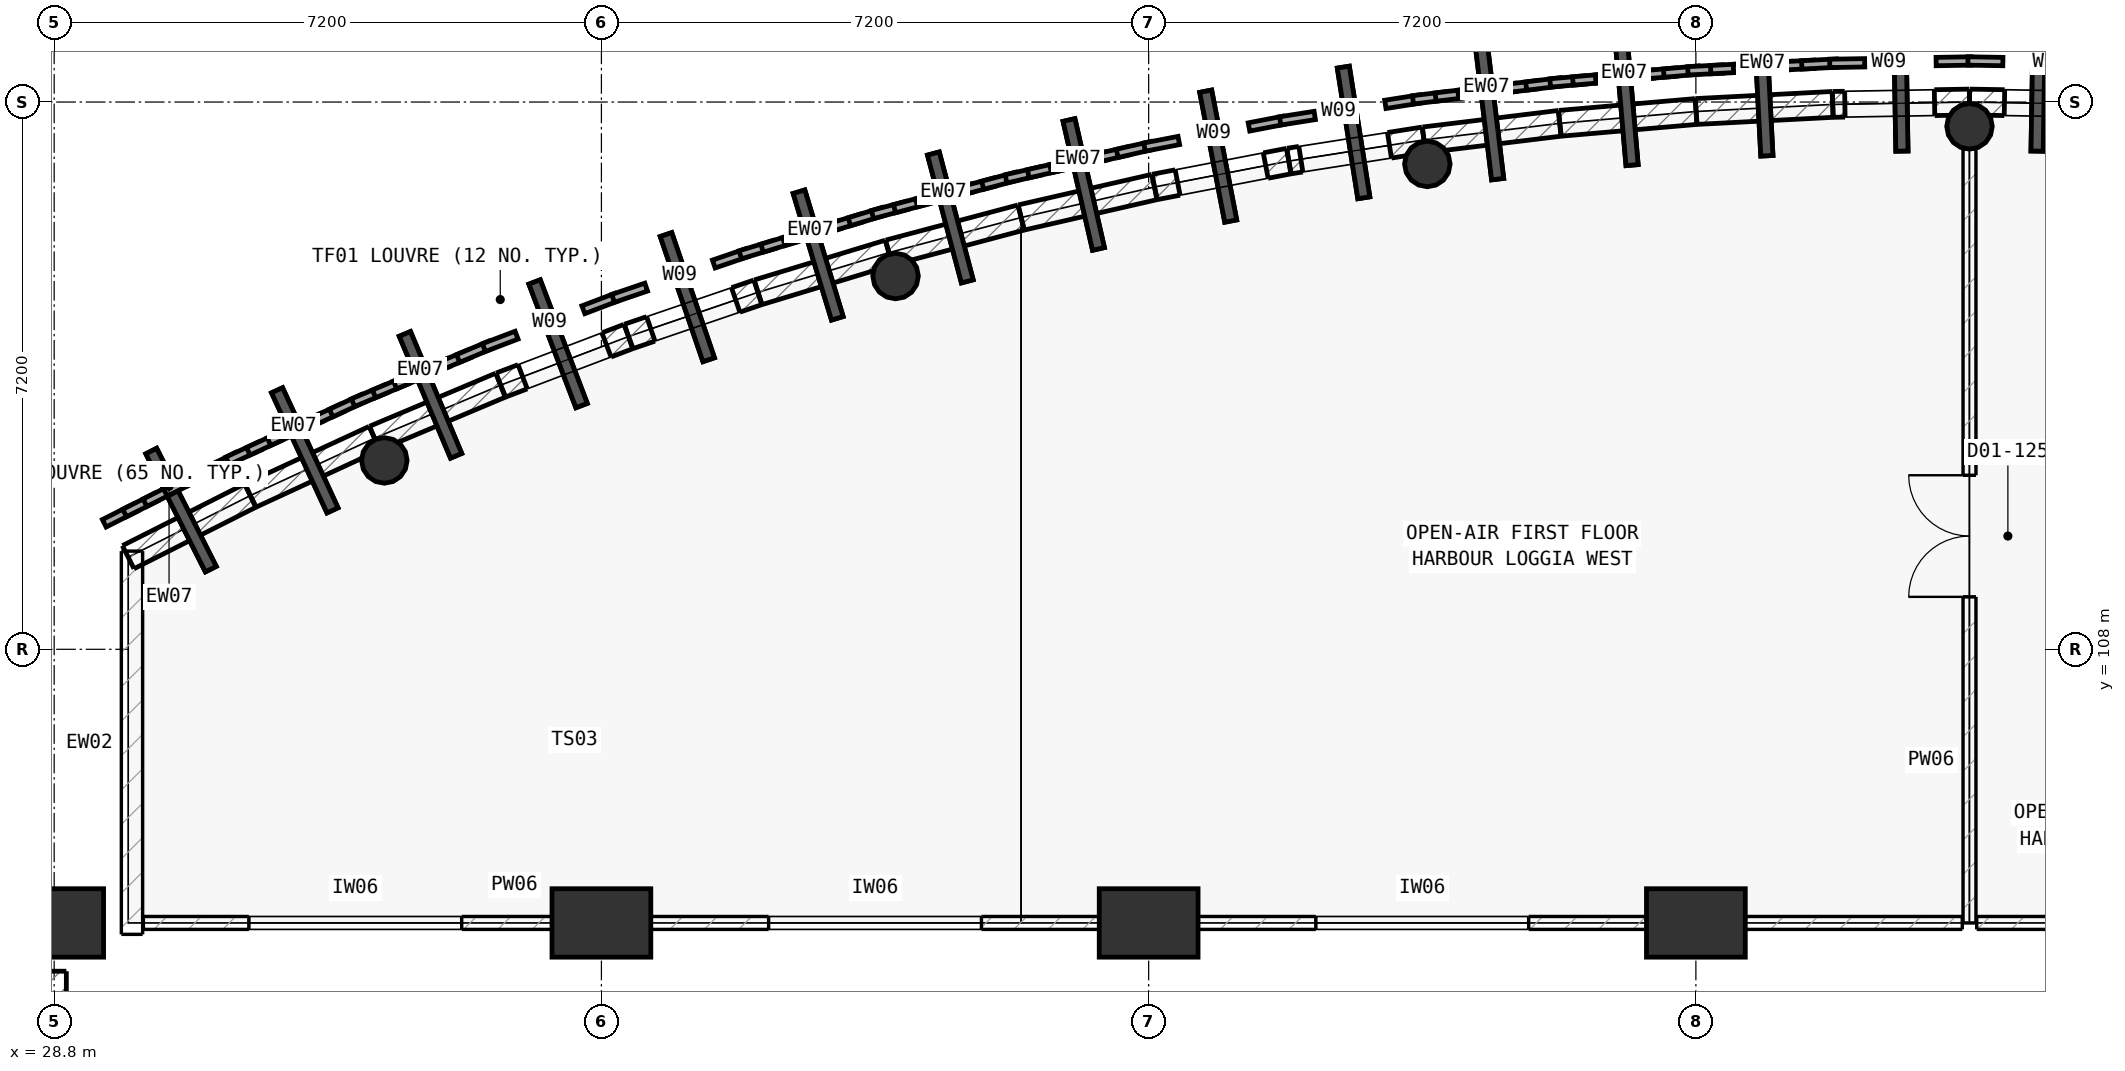
"""IFC4 building model, lengths in metres.
Left out: names, types, materials, properties, quantities, classifications, styles, units other than length and angle.
Written with IfcOpenShell. Run it as: python <this file> out.ifc"""

import sys

from ifc_helpers import new_model, si_unit, direction, frame, frame_2d, origin, origin_2d, place, context, subcontext, project, spatial, polyline, rectangle, circle, outline, extrude, element, fill, save


model = new_model("IFC4")
c1 = context("Model", 3, precision=1e-05, world=origin(), true_north=direction((0.0, 1.0)))
c2 = subcontext(c1, "Body", "Model", "MODEL_VIEW")
j1 = project(units=[si_unit("LENGTHUNIT", "METRE"), si_unit("PLANEANGLEUNIT", "RADIAN")], contexts=[c1])
p1 = place(None, origin())
s1 = spatial("IfcSite", under=j1, at=p1, CompositionType="ELEMENT")
p2 = place(p1, origin())
s2 = spatial("IfcBuilding", under=s1, at=p2, CompositionType="ELEMENT")
p3 = place(p2, frame((0.0, 0.0, 5.6)))
s3 = spatial("IfcBuildingStorey", under=s2, at=p3, CompositionType="ELEMENT", Elevation=5.6)
p4 = place(p3, frame((28.8, 104.4, 0.0), z_axis=(0.0, 0.0, 1.0), x_axis=(1.0, 0.0, 0.0)))
e1 = element("IfcColumn", 1, at=p4, inside=s3, PredefinedType="COLUMN", context=c2, shape_type="SweptSolid", body=[
    extrude(rectangle(XDim=0.9, YDim=1.3, at=origin_2d()), origin(), (0.0, 0.0, 1.0), 4.8),
])
p5 = place(p3, frame((33.144, 110.485, 0.0), z_axis=(0.0, 0.0, 1.0), x_axis=(1.0, 0.0, 0.0)))
e2 = element("IfcColumn", 2, at=p5, inside=s3, PredefinedType="COLUMN", context=c2, shape_type="SweptSolid", body=[
    extrude(circle(Radius=0.3, at=origin_2d()), origin(), (0.0, 0.0, 1.0), 5.6),
])
p6 = place(p3, frame((36.0, 104.4, 0.0), z_axis=(0.0, 0.0, 1.0), x_axis=(1.0, 0.0, 0.0)))
e3 = element("IfcColumn", 3, at=p6, inside=s3, PredefinedType="COLUMN", context=c2, shape_type="SweptSolid", body=[
    extrude(rectangle(XDim=0.9, YDim=1.3, at=origin_2d()), origin(), (0.0, 0.0, 1.0), 4.8),
])
p7 = place(p3, frame((39.87, 112.911, 0.0), z_axis=(0.0, 0.0, 1.0), x_axis=(1.0, 0.0, 0.0)))
e4 = element("IfcColumn", 4, at=p7, inside=s3, PredefinedType="COLUMN", context=c2, shape_type="SweptSolid", body=[
    extrude(circle(Radius=0.3, at=origin_2d()), origin(), (0.0, 0.0, 1.0), 5.6),
])
p8 = place(p3, frame((43.2, 104.4, 0.0), z_axis=(0.0, 0.0, 1.0), x_axis=(1.0, 0.0, 0.0)))
e5 = element("IfcColumn", 5, at=p8, inside=s3, PredefinedType="COLUMN", context=c2, shape_type="SweptSolid", body=[
    extrude(rectangle(XDim=0.9, YDim=1.3, at=origin_2d()), origin(), (0.0, 0.0, 1.0), 4.8),
])
p9 = place(p3, frame((46.867, 114.385, 0.0), z_axis=(0.0, 0.0, 1.0), x_axis=(1.0, 0.0, 0.0)))
e6 = element("IfcColumn", 6, at=p9, inside=s3, PredefinedType="COLUMN", context=c2, shape_type="SweptSolid", body=[
    extrude(circle(Radius=0.3, at=origin_2d()), origin(), (0.0, 0.0, 1.0), 5.6),
])
p10 = place(p3, frame((50.4, 104.4, 0.0), z_axis=(0.0, 0.0, 1.0), x_axis=(1.0, 0.0, 0.0)))
e7 = element("IfcColumn", 7, at=p10, inside=s3, PredefinedType="COLUMN", context=c2, shape_type="SweptSolid", body=[
    extrude(rectangle(XDim=0.9, YDim=1.3, at=origin_2d()), origin(), (0.0, 0.0, 1.0), 4.8),
])
p11 = place(p3, frame((54.0, 114.88, 0.0), z_axis=(0.0, 0.0, 1.0), x_axis=(1.0, 0.0, 0.0)))
e8 = element("IfcColumn", 8, at=p11, inside=s3, PredefinedType="COLUMN", context=c2, shape_type="SweptSolid", body=[
    extrude(circle(Radius=0.3, at=origin_2d()), origin(), (0.0, 0.0, 1.0), 5.6),
])
for number, where, z_axis, x_axis in (
    (9, (29.774, 109.212, 0.0), (0.0, 0.0, 1.0), (0.893, 0.45, 0.0)),
    (10, (31.381, 110.023, 0.0), (0.0, 0.0, 1.0), (0.908, 0.419, 0.0)),
):
    element("IfcWall", number, at=place(p3, frame(where, z_axis=z_axis, x_axis=x_axis)), inside=s3, PredefinedType="SOLIDWALL", context=c2, shape_type="SweptSolid", body=[
        extrude(outline(polyline([(0.003, -0.17), (1.797, -0.17), (1.803, 0.17), (-0.003, 0.17), (0.003, -0.17)])), origin(), (0.0, 0.0, 1.0), 5.6),
    ])
p12 = place(p3, frame((33.015, 110.778, 0.0), z_axis=(0.0, 0.0, 1.0), x_axis=(0.921803799964, 0.387656748131, 0.0)))
e11 = element("IfcWall", 11, at=p12, inside=s3, PredefinedType="SOLIDWALL", context=c2, shape_type="SweptSolid", body=[
    extrude(outline(polyline([(0.003, -0.17), (1.797, -0.17), (1.803, 0.17), (-0.003, 0.17), (0.003, -0.17)])), origin(), (0.0, 0.0, 1.0), 5.6),
])
p13 = place(p3, frame((34.674, 111.475, 0.0), z_axis=(0.0, 0.0, 1.0), x_axis=(0.934674543416, 0.35550456803, 0.0)))
e12 = element("IfcWall", 12, at=p13, inside=s3, PredefinedType="SOLIDWALL", context=c2, shape_type="SweptSolid", body=[
    extrude(outline(polyline([(0.003, -0.17), (1.797, -0.17), (1.803, 0.17), (-0.003, 0.17), (0.003, -0.17)])), origin(), (0.0, 0.0, 1.0), 5.6),
])
p14 = place(p13, frame((0.31, 0.0, 0.7)))
e13 = element("IfcOpeningElement", 13, at=p14, cuts=e12, PredefinedType="OPENING", context=c2, shape_type="SweptSolid", body=[
    extrude(rectangle(XDim=1.18, YDim=4.1, at=frame_2d((0.59, 2.05))), frame((0.0, 0.18, 0.0), z_axis=(0.0, -1.0, 0.0), x_axis=(1.0, 0.0, 0.0)), (0.0, 0.0, 1.0), 0.36),
])
p15 = place(p3, frame((36.356, 112.115, 0.0), z_axis=(0.0, 0.0, 1.0), x_axis=(0.946421657721, 0.322933500578, 0.0)))
e14 = element("IfcWall", 14, at=p15, inside=s3, PredefinedType="SOLIDWALL", context=c2, shape_type="SweptSolid", body=[
    extrude(outline(polyline([(0.003, -0.17), (1.797, -0.17), (1.803, 0.17), (-0.003, 0.17), (0.003, -0.17)])), origin(), (0.0, 0.0, 1.0), 5.6),
])
p16 = place(p15, frame((0.31, 0.0, 0.7)))
e15 = element("IfcOpeningElement", 15, at=p16, cuts=e14, PredefinedType="OPENING", context=c2, shape_type="SweptSolid", body=[
    extrude(rectangle(XDim=1.18, YDim=4.1, at=frame_2d((0.59, 2.05))), frame((0.0, 0.18, 0.0), z_axis=(0.0, -1.0, 0.0), x_axis=(1.0, 0.0, 0.0)), (0.0, 0.0, 1.0), 0.36),
])
p17 = place(p3, frame((38.06, 112.697, 0.0), z_axis=(0.0, 0.0, 1.0), x_axis=(0.956993600338, 0.290109029354, 0.0)))
e16 = element("IfcWall", 16, at=p17, inside=s3, PredefinedType="SOLIDWALL", context=c2, shape_type="SweptSolid", body=[
    extrude(outline(polyline([(0.003, -0.17), (1.797, -0.17), (1.803, 0.17), (-0.003, 0.17), (0.003, -0.17)])), origin(), (0.0, 0.0, 1.0), 5.6),
])
p18 = place(p3, frame((39.783, 113.219, 0.0), z_axis=(0.0, 0.0, 1.0), x_axis=(0.966504582235, 0.256649357135, 0.0)))
e17 = element("IfcWall", 17, at=p18, inside=s3, PredefinedType="SOLIDWALL", context=c2, shape_type="SweptSolid", body=[
    extrude(outline(polyline([(0.003, -0.17), (1.797, -0.17), (1.803, 0.17), (-0.003, 0.17), (0.003, -0.17)])), origin(), (0.0, 0.0, 1.0), 5.6),
])
p19 = place(p3, frame((41.522, 113.681, 0.0), z_axis=(0.0, 0.0, 1.0), x_axis=(0.974791962114, 0.223115733641, 0.0)))
e18 = element("IfcWall", 18, at=p19, inside=s3, PredefinedType="SOLIDWALL", context=c2, shape_type="SweptSolid", body=[
    extrude(outline(polyline([(0.003, -0.17), (1.797, -0.17), (1.803, 0.17), (-0.003, 0.17), (0.003, -0.17)])), origin(), (0.0, 0.0, 1.0), 5.6),
])
p20 = place(p3, frame((43.277, 114.082, 0.0), z_axis=(0.0, 0.0, 1.0), x_axis=(0.981913462005, 0.189330275271, 0.0)))
e19 = element("IfcWall", 19, at=p20, inside=s3, PredefinedType="SOLIDWALL", context=c2, shape_type="SweptSolid", body=[
    extrude(outline(polyline([(0.003, -0.17), (1.797, -0.17), (1.803, 0.17), (-0.003, 0.17), (0.003, -0.17)])), origin(), (0.0, 0.0, 1.0), 5.6),
])
p21 = place(p20, frame((0.31, 0.0, 0.7)))
e20 = element("IfcOpeningElement", 20, at=p21, cuts=e19, PredefinedType="OPENING", context=c2, shape_type="SweptSolid", body=[
    extrude(rectangle(XDim=1.18, YDim=4.1, at=frame_2d((0.59, 2.05))), frame((0.0, 0.18, 0.0), z_axis=(0.0, -1.0, 0.0), x_axis=(1.0, 0.0, 0.0)), (0.0, 0.0, 1.0), 0.36),
])
p22 = place(p3, frame((45.044, 114.423, 0.0), z_axis=(0.0, 0.0, 1.0), x_axis=(0.987886929918, 0.155175428783, 0.0)))
e21 = element("IfcWall", 21, at=p22, inside=s3, PredefinedType="SOLIDWALL", context=c2, shape_type="SweptSolid", body=[
    extrude(outline(polyline([(0.003, -0.17), (1.797, -0.17), (1.803, 0.17), (-0.003, 0.17), (0.003, -0.17)])), origin(), (0.0, 0.0, 1.0), 5.6),
])
p23 = place(p22, frame((0.16, 0.0, 0.7)))
e22 = element("IfcOpeningElement", 22, at=p23, cuts=e21, PredefinedType="OPENING", context=c2, shape_type="SweptSolid", body=[
    extrude(rectangle(XDim=1.18, YDim=4.1, at=frame_2d((0.59, 2.05))), frame((0.0, 0.18, 0.0), z_axis=(0.0, -1.0, 0.0), x_axis=(1.0, 0.0, 0.0)), (0.0, 0.0, 1.0), 0.36),
])
p24 = place(p3, frame((46.823, 114.702, 0.0), z_axis=(0.0, 0.0, 1.0), x_axis=(0.992671296073, 0.120845761006, 0.0)))
e23 = element("IfcWall", 23, at=p24, inside=s3, PredefinedType="SOLIDWALL", context=c2, shape_type="SweptSolid", body=[
    extrude(outline(polyline([(0.003, -0.17), (1.797, -0.17), (1.803, 0.17), (-0.003, 0.17), (0.003, -0.17)])), origin(), (0.0, 0.0, 1.0), 5.6),
])
p25 = place(p3, frame((48.609, 114.92, 0.0), z_axis=(0.0, 0.0, 1.0), x_axis=(0.996260411494, 0.086401345422, 0.0)))
e24 = element("IfcWall", 24, at=p25, inside=s3, PredefinedType="SOLIDWALL", context=c2, shape_type="SweptSolid", body=[
    extrude(outline(polyline([(0.003, -0.17), (1.797, -0.17), (1.803, 0.17), (-0.003, 0.17), (0.003, -0.17)])), origin(), (0.0, 0.0, 1.0), 5.6),
])
p26 = place(p3, frame((50.403, 115.075, 0.0), z_axis=(0.0, 0.0, 1.0), x_axis=(0.998649863362, 0.051946611119, 0.0)))
e25 = element("IfcWall", 25, at=p26, inside=s3, PredefinedType="SOLIDWALL", context=c2, shape_type="SweptSolid", body=[
    extrude(outline(polyline([(0.003, -0.17), (1.797, -0.17), (1.803, 0.17), (-0.003, 0.17), (0.003, -0.17)])), origin(), (0.0, 0.0, 1.0), 5.6),
])
p27 = place(p3, frame((52.2, 115.169, 0.0), z_axis=(0.0, 0.0, 1.0), x_axis=(0.999851642284, 0.017224790907, 0.0)))
e26 = element("IfcWall", 26, at=p27, inside=s3, PredefinedType="SOLIDWALL", context=c2, shape_type="SweptSolid", body=[
    extrude(outline(polyline([(0.003, -0.17), (1.797, -0.17), (1.803, 0.17), (-0.003, 0.17), (0.003, -0.17)])), origin(), (0.0, 0.0, 1.0), 5.6),
])
p28 = place(p27, frame((0.16, 0.0, 0.7)))
e27 = element("IfcOpeningElement", 27, at=p28, cuts=e26, PredefinedType="OPENING", context=c2, shape_type="SweptSolid", body=[
    extrude(rectangle(XDim=1.18, YDim=4.1, at=frame_2d((0.59, 2.05))), frame((0.0, 0.18, 0.0), z_axis=(0.0, -1.0, 0.0), x_axis=(1.0, 0.0, 0.0)), (0.0, 0.0, 1.0), 0.36),
])
p29 = place(p3, frame((54.0, 115.2, 0.0), z_axis=(0.0, 0.0, 1.0), x_axis=(0.999851642284, -0.017224790907, 0.0)))
e28 = element("IfcWall", 28, at=p29, inside=s3, PredefinedType="SOLIDWALL", context=c2, shape_type="SweptSolid", body=[
    extrude(outline(polyline([(0.003, -0.17), (1.797, -0.17), (1.803, 0.17), (-0.003, 0.17), (0.003, -0.17)])), origin(), (0.0, 0.0, 1.0), 5.6),
])
p30 = place(p29, frame((0.46, 0.0, 0.7)))
e29 = element("IfcOpeningElement", 29, at=p30, cuts=e28, PredefinedType="OPENING", context=c2, shape_type="SweptSolid", body=[
    extrude(rectangle(XDim=1.18, YDim=4.1, at=frame_2d((0.59, 2.05))), frame((0.0, 0.18, 0.0), z_axis=(0.0, -1.0, 0.0), x_axis=(1.0, 0.0, 0.0)), (0.0, 0.0, 1.0), 0.36),
])
p31 = place(p3, frame((29.824, 104.25, 0.0), z_axis=(0.0, 0.0, 1.0), x_axis=(0.0, 1.0, 0.0)))
e30 = element("IfcWall", 30, at=p31, inside=s3, PredefinedType="SOLIDWALL", context=c2, shape_type="SweptSolid", body=[
    extrude(rectangle(XDim=5.042, YDim=0.28, at=frame_2d((2.521, 0.0))), origin(), (0.0, 0.0, 1.0), 5.29),
])
p32 = place(p3, frame((28.8, 94.035, 0.0), z_axis=(0.0, 0.0, 1.0), x_axis=(0.0, 1.0, 0.0)))
e31 = element("IfcWall", 31, at=p32, inside=s3, PredefinedType="SOLIDWALL", context=c2, shape_type="SweptSolid", body=[
    extrude(rectangle(XDim=9.73, YDim=0.32, at=frame_2d((4.865, 0.0))), origin(), (0.0, 0.0, 1.0), 5.6),
])
p33 = place(p3, frame((54.0, 104.4, 0.0), z_axis=(0.0, 0.0, 1.0), x_axis=(0.0, 1.0, 0.0)))
e32 = element("IfcWall", 32, at=p33, inside=s3, PredefinedType="PARTITIONING", context=c2, shape_type="SweptSolid", body=[
    extrude(rectangle(XDim=10.18, YDim=0.17, at=frame_2d((5.09, 0.0))), origin(), (0.0, 0.0, 1.0), 5.29),
])
p34 = place(p33, frame((4.29, 0.0, 0.0)))
e33 = element("IfcOpeningElement", 33, at=p34, cuts=e32, PredefinedType="OPENING", context=c2, shape_type="SweptSolid", body=[
    extrude(rectangle(XDim=1.6, YDim=2.2, at=frame_2d((0.8, 1.1))), frame((0.0, 0.095, 0.0), z_axis=(0.0, -1.0, 0.0), x_axis=(1.0, 0.0, 0.0)), (0.0, 0.0, 1.0), 0.19),
])
p35 = place(p3, frame((29.974, 104.4, 0.0), z_axis=(0.0, 0.0, 1.0), x_axis=(1.0, 0.0, 0.0)))
e34 = element("IfcWall", 34, at=p35, inside=s3, PredefinedType="PARTITIONING", context=c2, shape_type="SweptSolid", body=[
    extrude(rectangle(XDim=5.576, YDim=0.17, at=frame_2d((2.788, 0.0))), origin(), (0.0, 0.0, 1.0), 4.68),
])
p36 = place(p35, frame((1.388, 0.0, 0.95)))
e35 = element("IfcOpeningElement", 35, at=p36, cuts=e34, PredefinedType="OPENING", context=c2, shape_type="SweptSolid", body=[
    extrude(rectangle(XDim=2.8, YDim=1.9, at=frame_2d((1.4, 0.95))), frame((0.0, 0.095, 0.0), z_axis=(0.0, -1.0, 0.0), x_axis=(1.0, 0.0, 0.0)), (0.0, 0.0, 1.0), 0.19),
])
p37 = place(p3, frame((36.45, 104.4, 0.0), z_axis=(0.0, 0.0, 1.0), x_axis=(1.0, 0.0, 0.0)))
e36 = element("IfcWall", 36, at=p37, inside=s3, PredefinedType="PARTITIONING", context=c2, shape_type="SweptSolid", body=[
    extrude(rectangle(XDim=6.3, YDim=0.17, at=frame_2d((3.15, 0.0))), origin(), (0.0, 0.0, 1.0), 4.68),
])
p38 = place(p37, frame((1.75, 0.0, 0.95)))
e37 = element("IfcOpeningElement", 37, at=p38, cuts=e36, PredefinedType="OPENING", context=c2, shape_type="SweptSolid", body=[
    extrude(rectangle(XDim=2.8, YDim=1.9, at=frame_2d((1.4, 0.95))), frame((0.0, 0.095, 0.0), z_axis=(0.0, -1.0, 0.0), x_axis=(1.0, 0.0, 0.0)), (0.0, 0.0, 1.0), 0.19),
])
p39 = place(p3, frame((43.65, 104.4, 0.0), z_axis=(0.0, 0.0, 1.0), x_axis=(1.0, 0.0, 0.0)))
e38 = element("IfcWall", 38, at=p39, inside=s3, PredefinedType="PARTITIONING", context=c2, shape_type="SweptSolid", body=[
    extrude(rectangle(XDim=6.3, YDim=0.17, at=frame_2d((3.15, 0.0))), origin(), (0.0, 0.0, 1.0), 4.68),
])
p40 = place(p39, frame((1.75, 0.0, 0.95)))
e39 = element("IfcOpeningElement", 39, at=p40, cuts=e38, PredefinedType="OPENING", context=c2, shape_type="SweptSolid", body=[
    extrude(rectangle(XDim=2.8, YDim=1.9, at=frame_2d((1.4, 0.95))), frame((0.0, 0.095, 0.0), z_axis=(0.0, -1.0, 0.0), x_axis=(1.0, 0.0, 0.0)), (0.0, 0.0, 1.0), 0.19),
])
for number, where, z_axis, x_axis in (
    (40, (50.85, 104.4, 0.0), (0.0, 0.0, 1.0), (1.0, 0.0, 0.0)),
    (41, (54.095, 104.4, 0.0), (0.0, 0.0, 1.0), (1.0, 0.0, 0.0)),
):
    element("IfcWall", number, at=place(p3, frame(where, z_axis=z_axis, x_axis=x_axis)), inside=s3, PredefinedType="PARTITIONING", context=c2, shape_type="SweptSolid", body=[
        extrude(rectangle(XDim=3.055, YDim=0.17, at=frame_2d((1.527, 0.0))), origin(), (0.0, 0.0, 1.0), 4.68),
    ])
p41 = place(p14, origin())
e42 = element("IfcWindow", 42, at=p41, inside=s3, PartitioningType="SINGLE_PANEL", PredefinedType="WINDOW", context=c2, shape_type="SweptSolid", body=[
    extrude(rectangle(XDim=1.18, YDim=4.1, at=frame_2d((0.59, 2.05))), frame((0.0, 0.03, 0.0), z_axis=(0.0, -1.0, 0.0), x_axis=(1.0, 0.0, 0.0)), (0.0, 0.0, 1.0), 0.06),
])
fill(e13, e42)
p42 = place(p16, origin())
e43 = element("IfcWindow", 43, at=p42, inside=s3, PartitioningType="SINGLE_PANEL", PredefinedType="WINDOW", context=c2, shape_type="SweptSolid", body=[
    extrude(rectangle(XDim=1.18, YDim=4.1, at=frame_2d((0.59, 2.05))), frame((0.0, 0.03, 0.0), z_axis=(0.0, -1.0, 0.0), x_axis=(1.0, 0.0, 0.0)), (0.0, 0.0, 1.0), 0.06),
])
fill(e15, e43)
p43 = place(p21, origin())
e44 = element("IfcWindow", 44, at=p43, inside=s3, PartitioningType="SINGLE_PANEL", PredefinedType="WINDOW", context=c2, shape_type="SweptSolid", body=[
    extrude(rectangle(XDim=1.18, YDim=4.1, at=frame_2d((0.59, 2.05))), frame((0.0, 0.03, 0.0), z_axis=(0.0, -1.0, 0.0), x_axis=(1.0, 0.0, 0.0)), (0.0, 0.0, 1.0), 0.06),
])
fill(e20, e44)
p44 = place(p23, origin())
e45 = element("IfcWindow", 45, at=p44, inside=s3, PartitioningType="SINGLE_PANEL", PredefinedType="WINDOW", context=c2, shape_type="SweptSolid", body=[
    extrude(rectangle(XDim=1.18, YDim=4.1, at=frame_2d((0.59, 2.05))), frame((0.0, 0.03, 0.0), z_axis=(0.0, -1.0, 0.0), x_axis=(1.0, 0.0, 0.0)), (0.0, 0.0, 1.0), 0.06),
])
fill(e22, e45)
p45 = place(p28, origin())
e46 = element("IfcWindow", 46, at=p45, inside=s3, PartitioningType="SINGLE_PANEL", PredefinedType="WINDOW", context=c2, shape_type="SweptSolid", body=[
    extrude(rectangle(XDim=1.18, YDim=4.1, at=frame_2d((0.59, 2.05))), frame((0.0, 0.03, 0.0), z_axis=(0.0, -1.0, 0.0), x_axis=(1.0, 0.0, 0.0)), (0.0, 0.0, 1.0), 0.06),
])
fill(e27, e46)
p46 = place(p30, origin())
e47 = element("IfcWindow", 47, at=p46, inside=s3, PartitioningType="SINGLE_PANEL", PredefinedType="WINDOW", context=c2, shape_type="SweptSolid", body=[
    extrude(rectangle(XDim=1.18, YDim=4.1, at=frame_2d((0.59, 2.05))), frame((0.0, 0.03, 0.0), z_axis=(0.0, -1.0, 0.0), x_axis=(1.0, 0.0, 0.0)), (0.0, 0.0, 1.0), 0.06),
])
fill(e29, e47)
p47 = place(p34, origin())
e48 = element("IfcDoor", 48, at=p47, inside=s3, OperationType="DOUBLE_DOOR_SINGLE_SWING", PredefinedType="DOOR", context=c2, shape_type="SweptSolid", body=[
    extrude(rectangle(XDim=1.6, YDim=2.2, at=frame_2d((0.8, 1.1))), frame((0.0, 0.025, 0.0), z_axis=(0.0, -1.0, 0.0), x_axis=(1.0, 0.0, 0.0)), (0.0, 0.0, 1.0), 0.05),
])
fill(e33, e48)
p48 = place(p36, origin())
e49 = element("IfcWindow", 49, at=p48, inside=s3, PartitioningType="SINGLE_PANEL", PredefinedType="WINDOW", context=c2, shape_type="SweptSolid", body=[
    extrude(rectangle(XDim=2.8, YDim=1.9, at=frame_2d((1.4, 0.95))), frame((0.0, 0.03, 0.0), z_axis=(0.0, -1.0, 0.0), x_axis=(1.0, 0.0, 0.0)), (0.0, 0.0, 1.0), 0.06),
])
fill(e35, e49)
p49 = place(p38, origin())
e50 = element("IfcWindow", 50, at=p49, inside=s3, PartitioningType="SINGLE_PANEL", PredefinedType="WINDOW", context=c2, shape_type="SweptSolid", body=[
    extrude(rectangle(XDim=2.8, YDim=1.9, at=frame_2d((1.4, 0.95))), frame((0.0, 0.03, 0.0), z_axis=(0.0, -1.0, 0.0), x_axis=(1.0, 0.0, 0.0)), (0.0, 0.0, 1.0), 0.06),
])
fill(e37, e50)
p50 = place(p40, origin())
e51 = element("IfcWindow", 51, at=p50, inside=s3, PartitioningType="SINGLE_PANEL", PredefinedType="WINDOW", context=c2, shape_type="SweptSolid", body=[
    extrude(rectangle(XDim=2.8, YDim=1.9, at=frame_2d((1.4, 0.95))), frame((0.0, 0.03, 0.0), z_axis=(0.0, -1.0, 0.0), x_axis=(1.0, 0.0, 0.0)), (0.0, 0.0, 1.0), 0.06),
])
fill(e39, e51)
save(model, sys.argv[1])
